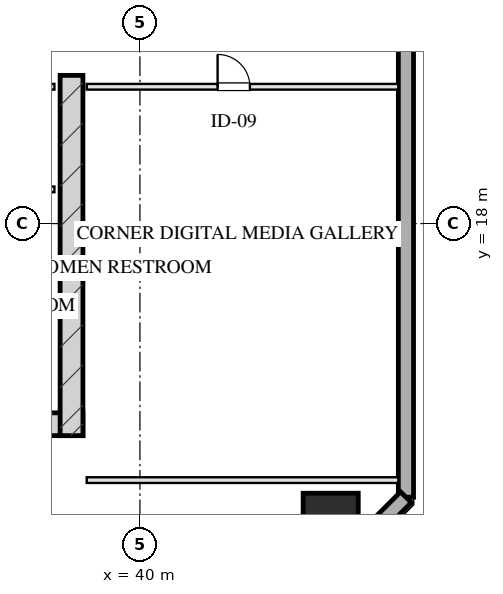
"""IFC4 building model, lengths in metres.
Left out: names, types, materials, properties, quantities, classifications, styles, units other than length and angle.
Written with IfcOpenShell. Run it as: python <this file> out.ifc"""

import sys

from ifc_helpers import new_model, si_unit, direction, frame, frame_2d, origin, origin_2d, place, context, subcontext, project, spatial, rectangle, hollow_rectangle, extrude, element, fill, save


model = new_model("IFC4")
c1 = context("Model", 3, precision=1e-05, world=origin(), true_north=direction((0.0, 1.0)))
c2 = subcontext(c1, "Body", "Model", "MODEL_VIEW")
j1 = project(units=[si_unit("LENGTHUNIT", "METRE"), si_unit("PLANEANGLEUNIT", "RADIAN")], contexts=[c1])
p1 = place(None, origin())
s1 = spatial("IfcSite", under=j1, at=p1, CompositionType="ELEMENT")
p2 = place(p1, origin())
s2 = spatial("IfcBuilding", under=s1, at=p2, CompositionType="ELEMENT")
p3 = place(p2, frame((0.0, 0.0, 180.55)))
s3 = spatial("IfcBuildingStorey", under=s2, at=p3, CompositionType="ELEMENT", Elevation=180.55)
p4 = place(p3, frame((21.5, 12.72, 0.0), z_axis=(0.0, 0.0, 1.0), x_axis=(1.0, 0.0, 0.0)))
e1 = element("IfcWall", 1, at=p4, inside=s3, PredefinedType="SHEAR", context=c2, shape_type="SweptSolid", body=[
    extrude(rectangle(XDim=17.0, YDim=0.6, at=frame_2d((8.5, 0.0))), origin(), (0.0, 0.0, 1.0), 3.45),
])
p5 = place(p3, frame((38.2, 21.9, 0.0), z_axis=(0.0, 0.0, 1.0), x_axis=(0.0, -1.0, 0.0)))
e2 = element("IfcWall", 2, at=p5, inside=s3, PredefinedType="SHEAR", context=c2, shape_type="SweptSolid", body=[
    extrude(rectangle(XDim=9.48, YDim=0.6, at=frame_2d((4.74, 0.0))), origin(), (0.0, 0.0, 1.0), 3.45),
])
p6 = place(p3, frame((45.02, 10.18, 0.0), z_axis=(0.0, 0.0, 1.0), x_axis=(1.0, 0.0, 0.0)))
e3 = element("IfcColumn", 3, at=p6, inside=s3, PredefinedType="COLUMN", context=c2, shape_type="SweptSolid", body=[
    extrude(hollow_rectangle(XDim=1.45, YDim=1.45, WallThickness=0.05, at=origin_2d()), origin(), (0.0, 0.0, 1.0), 3.451),
])
p7 = place(p3, frame((47.0, 57.2, 0.0), z_axis=(0.0, 0.0, 1.0), x_axis=(0.0, -1.0, 0.0)))
e4 = element("IfcWall", 4, at=p7, inside=s3, PredefinedType="SOLIDWALL", context=c2, shape_type="SweptSolid", body=[
    extrude(rectangle(XDim=46.4, YDim=0.4, at=frame_2d((23.2, 0.0))), origin(), (0.0, 0.0, 1.0), 2.55),
])
p8 = place(p7, frame((28.55, 0.0, 0.75)))
e5 = element("IfcOpeningElement", 5, at=p8, cuts=e4, PredefinedType="OPENING", context=c2, shape_type="SweptSolid", body=[
    extrude(rectangle(XDim=2.1, YDim=1.4, at=frame_2d((1.05, 0.7))), frame((0.0, 0.21, 0.0), z_axis=(0.0, -1.0, 0.0), x_axis=(1.0, 0.0, 0.0)), (0.0, 0.0, 1.0), 0.42),
])
p9 = place(p7, frame((24.75, 0.0, 0.75)))
e6 = element("IfcOpeningElement", 6, at=p9, cuts=e4, PredefinedType="OPENING", context=c2, shape_type="SweptSolid", body=[
    extrude(rectangle(XDim=2.1, YDim=1.4, at=frame_2d((1.05, 0.7))), frame((0.0, 0.21, 0.0), z_axis=(0.0, -1.0, 0.0), x_axis=(1.0, 0.0, 0.0)), (0.0, 0.0, 1.0), 0.42),
])
p10 = place(p7, frame((19.55, 0.0, 0.75)))
e7 = element("IfcOpeningElement", 7, at=p10, cuts=e4, PredefinedType="OPENING", context=c2, shape_type="SweptSolid", body=[
    extrude(rectangle(XDim=2.1, YDim=1.4, at=frame_2d((1.05, 0.7))), frame((0.0, 0.21, 0.0), z_axis=(0.0, -1.0, 0.0), x_axis=(1.0, 0.0, 0.0)), (0.0, 0.0, 1.0), 0.42),
])
p11 = place(p7, frame((15.75, 0.0, 0.75)))
e8 = element("IfcOpeningElement", 8, at=p11, cuts=e4, PredefinedType="OPENING", context=c2, shape_type="SweptSolid", body=[
    extrude(rectangle(XDim=2.1, YDim=1.4, at=frame_2d((1.05, 0.7))), frame((0.0, 0.21, 0.0), z_axis=(0.0, -1.0, 0.0), x_axis=(1.0, 0.0, 0.0)), (0.0, 0.0, 1.0), 0.42),
])
p12 = place(p3, frame((47.0, 10.8, 0.0), z_axis=(0.0, 0.0, 1.0), x_axis=(-0.707106781187, -0.707106781187, 0.0)))
e9 = element("IfcWall", 9, at=p12, inside=s3, PredefinedType="SOLIDWALL", context=c2, shape_type="SweptSolid", body=[
    extrude(rectangle(XDim=3.677, YDim=0.4, at=frame_2d((1.838, 0.0))), origin(), (0.0, 0.0, 1.0), 2.55),
])
p13 = place(p3, frame((33.95, 21.6, 0.0), z_axis=(0.0, 0.0, 1.0), x_axis=(1.0, 0.0, 0.0)))
e10 = element("IfcWall", 10, at=p13, inside=s3, PredefinedType="PARTITIONING", context=c2, shape_type="SweptSolid", body=[
    extrude(rectangle(XDim=3.8, YDim=0.15, at=frame_2d((1.9, 0.0))), origin(), (0.0, 0.0, 1.0), 3.155),
])
p14 = place(p13, frame((0.45, 0.0, 0.0)))
e11 = element("IfcOpeningElement", 11, at=p14, cuts=e10, PredefinedType="OPENING", context=c2, shape_type="SweptSolid", body=[
    extrude(rectangle(XDim=0.95, YDim=2.05, at=frame_2d((0.475, 1.025))), frame((0.0, 0.085, 0.0), z_axis=(0.0, -1.0, 0.0), x_axis=(1.0, 0.0, 0.0)), (0.0, 0.0, 1.0), 0.17),
])
p15 = place(p3, frame((33.95, 18.9, 0.0), z_axis=(0.0, 0.0, 1.0), x_axis=(1.0, 0.0, 0.0)))
e12 = element("IfcWall", 12, at=p15, inside=s3, PredefinedType="PARTITIONING", context=c2, shape_type="SweptSolid", body=[
    extrude(rectangle(XDim=3.8, YDim=0.15, at=frame_2d((1.9, 0.0))), origin(), (0.0, 0.0, 1.0), 3.155),
])
p16 = place(p15, frame((0.35, 0.0, 0.0)))
e13 = element("IfcOpeningElement", 13, at=p16, cuts=e12, PredefinedType="OPENING", context=c2, shape_type="SweptSolid", body=[
    extrude(rectangle(XDim=0.9, YDim=2.05, at=frame_2d((0.45, 1.025))), frame((0.0, 0.085, 0.0), z_axis=(0.0, -1.0, 0.0), x_axis=(1.0, 0.0, 0.0)), (0.0, 0.0, 1.0), 0.17),
])
p17 = place(p15, frame((2.1, 0.0, 0.0)))
e14 = element("IfcOpeningElement", 14, at=p17, cuts=e12, PredefinedType="OPENING", context=c2, shape_type="SweptSolid", body=[
    extrude(rectangle(XDim=0.9, YDim=2.05, at=frame_2d((0.45, 1.025))), frame((0.0, 0.085, 0.0), z_axis=(0.0, -1.0, 0.0), x_axis=(1.0, 0.0, 0.0)), (0.0, 0.0, 1.0), 0.17),
])
p18 = place(p3, frame((38.6, 11.25, 0.0), z_axis=(0.0, 0.0, 1.0), x_axis=(1.0, 0.0, 0.0)))
e15 = element("IfcWall", 15, at=p18, inside=s3, PredefinedType="PARTITIONING", context=c2, shape_type="SweptSolid", body=[
    extrude(rectangle(XDim=8.2, YDim=0.15, at=frame_2d((4.1, 0.0))), origin(), (0.0, 0.0, 1.0), 3.155),
])
p19 = place(p3, frame((38.6, 21.6, 0.0), z_axis=(0.0, 0.0, 1.0), x_axis=(1.0, 0.0, 0.0)))
e16 = element("IfcWall", 16, at=p19, inside=s3, PredefinedType="PARTITIONING", context=c2, shape_type="SweptSolid", body=[
    extrude(rectangle(XDim=8.2, YDim=0.15, at=frame_2d((4.1, 0.0))), origin(), (0.0, 0.0, 1.0), 3.155),
])
p20 = place(p19, frame((3.444, 0.0, 0.0)))
e17 = element("IfcOpeningElement", 17, at=p20, cuts=e16, PredefinedType="OPENING", context=c2, shape_type="SweptSolid", body=[
    extrude(rectangle(XDim=0.85, YDim=2.05, at=frame_2d((0.425, 1.025))), frame((0.0, 0.085, 0.0), z_axis=(0.0, -1.0, 0.0), x_axis=(1.0, 0.0, 0.0)), (0.0, 0.0, 1.0), 0.17),
])
p21 = place(p20, origin())
e18 = element("IfcDoor", 18, at=p21, inside=s3, OperationType="SINGLE_SWING_LEFT", PredefinedType="DOOR", context=c2, shape_type="SweptSolid", body=[
    extrude(rectangle(XDim=0.85, YDim=2.05, at=frame_2d((0.425, 1.025))), frame((0.0, 0.025, 0.0), z_axis=(0.0, -1.0, 0.0), x_axis=(1.0, 0.0, 0.0)), (0.0, 0.0, 1.0), 0.05),
])
fill(e17, e18)
save(model, sys.argv[1])
